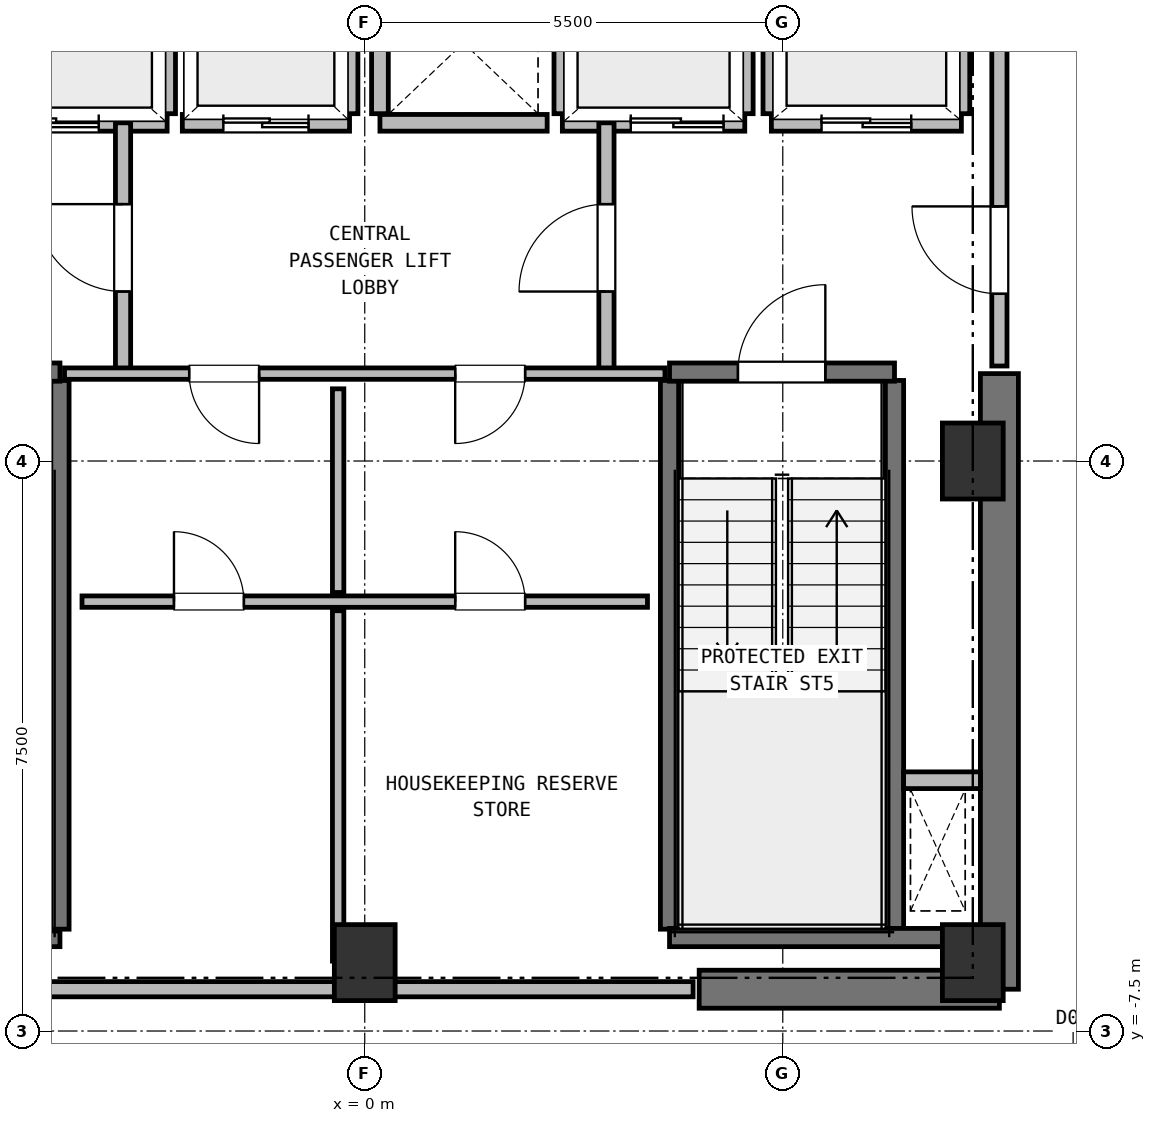
"""IFC4 building model, lengths in metres.
Left out: names, types, materials, properties, quantities, classifications, styles, units other than length and angle.
Written with IfcOpenShell. Run it as: python <this file> out.ifc"""

import sys

from ifc_helpers import new_model, si_unit, direction, frame, frame_2d, origin, origin_2d, place, context, subcontext, project, spatial, rectangle, extrude, element, fill, save


model = new_model("IFC4")
c1 = context("Model", 3, precision=1e-05, world=origin(), true_north=direction((0.0, 1.0)))
c2 = subcontext(c1, "Body", "Model", "MODEL_VIEW")
j1 = project(units=[si_unit("LENGTHUNIT", "METRE"), si_unit("PLANEANGLEUNIT", "RADIAN")], contexts=[c1])
p1 = place(None, origin())
s1 = spatial("IfcSite", under=j1, at=p1, CompositionType="ELEMENT")
p2 = place(p1, origin())
s2 = spatial("IfcBuilding", under=s1, at=p2, CompositionType="ELEMENT")
p3 = place(p2, frame((0.0, 0.0, 228.35)))
s3 = spatial("IfcBuildingStorey", under=s2, at=p3, CompositionType="ELEMENT", Elevation=228.35)
for number, where, z_axis, x_axis in (
    (1, (0.0, -6.6, 0.0), (0.0, 0.0, 1.0), (1.0, 0.0, 0.0)),
    (2, (8.0, -6.6, 0.0), (0.0, 0.0, 1.0), (1.0, 0.0, 0.0)),
    (3, (8.0, 0.0, 0.0), (0.0, 0.0, 1.0), (1.0, 0.0, 0.0)),
):
    element("IfcColumn", number, at=place(p3, frame(where, z_axis=z_axis, x_axis=x_axis)), inside=s3, PredefinedType="COLUMN", context=c2, shape_type="SweptSolid", body=[
        extrude(rectangle(XDim=0.8, YDim=1.0, at=origin_2d()), origin(), (0.0, 0.0, 1.0), 3.8),
    ])
p4 = place(p3, frame((4.4, -6.95, 0.0), z_axis=(0.0, 0.0, 1.0), x_axis=(1.0, 0.0, 0.0)))
e4 = element("IfcWall", 4, at=p4, inside=s3, PredefinedType="SHEAR", context=c2, shape_type="SweptSolid", body=[
    extrude(rectangle(XDim=3.95, YDim=0.5, at=frame_2d((1.975, 0.0))), origin(), (0.0, 0.0, 1.0), 3.55),
])
p5 = place(p3, frame((8.35, -6.95, 0.0), z_axis=(0.0, 0.0, 1.0), x_axis=(0.0, 1.0, 0.0)))
e5 = element("IfcWall", 5, at=p5, inside=s3, PredefinedType="SHEAR", context=c2, shape_type="SweptSolid", body=[
    extrude(rectangle(XDim=8.1, YDim=0.5, at=frame_2d((4.05, 0.0))), origin(), (0.0, 0.0, 1.0), 3.55),
])
p6 = place(p3, frame((-7.6, -6.27, 0.0), z_axis=(0.0, 0.0, 1.0), x_axis=(1.0, 0.0, 0.0)))
e6 = element("IfcWall", 6, at=p6, inside=s3, PredefinedType="SHEAR", context=c2, shape_type="SweptSolid", body=[
    extrude(rectangle(XDim=3.59, YDim=0.24, at=frame_2d((1.795, 0.0))), origin(), (0.0, 0.0, 1.0), 3.55),
])
p7 = place(p3, frame((-4.01, -6.16, 0.0), z_axis=(0.0, 0.0, 1.0), x_axis=(0.0, 1.0, 0.0)))
e7 = element("IfcWall", 7, at=p7, inside=s3, PredefinedType="SHEAR", context=c2, shape_type="SweptSolid", body=[
    extrude(rectangle(XDim=7.22, YDim=0.24, at=frame_2d((3.61, 0.0))), origin(), (0.0, 0.0, 1.0), 3.55),
])
p8 = place(p3, frame((-6.97, 1.17, 0.0), z_axis=(0.0, 0.0, 1.0), x_axis=(1.0, 0.0, 0.0)))
e8 = element("IfcWall", 8, at=p8, inside=s3, PredefinedType="SHEAR", context=c2, shape_type="SweptSolid", body=[
    extrude(rectangle(XDim=2.96, YDim=0.24, at=frame_2d((1.48, 0.0))), origin(), (0.0, 0.0, 1.0), 3.55),
])
p9 = place(p8, frame((0.9, 0.0, 0.0)))
e9 = element("IfcOpeningElement", 9, at=p9, cuts=e8, PredefinedType="OPENING", context=c2, shape_type="SweptSolid", body=[
    extrude(rectangle(XDim=1.15, YDim=2.15, at=frame_2d((0.575, 1.075))), frame((0.0, 0.13, 0.0), z_axis=(0.0, -1.0, 0.0), x_axis=(1.0, 0.0, 0.0)), (0.0, 0.0, 1.0), 0.26),
])
for number, where, z_axis, x_axis in (
    (10, (4.01, -6.16, 0.0), (0.0, 0.0, 1.0), (0.0, 1.0, 0.0)),
    (11, (6.97, -6.16, 0.0), (0.0, 0.0, 1.0), (0.0, 1.0, 0.0)),
):
    element("IfcWall", number, at=place(p3, frame(where, z_axis=z_axis, x_axis=x_axis)), inside=s3, PredefinedType="SHEAR", context=c2, shape_type="SweptSolid", body=[
        extrude(rectangle(XDim=7.22, YDim=0.24, at=frame_2d((3.61, 0.0))), origin(), (0.0, 0.0, 1.0), 3.55),
    ])
p10 = place(p3, frame((4.01, -6.27, 0.0), z_axis=(0.0, 0.0, 1.0), x_axis=(1.0, 0.0, 0.0)))
e12 = element("IfcWall", 12, at=p10, inside=s3, PredefinedType="SHEAR", context=c2, shape_type="SweptSolid", body=[
    extrude(rectangle(XDim=3.59, YDim=0.24, at=frame_2d((1.795, 0.0))), origin(), (0.0, 0.0, 1.0), 3.55),
])
p11 = place(p3, frame((4.01, 1.17, 0.0), z_axis=(0.0, 0.0, 1.0), x_axis=(1.0, 0.0, 0.0)))
e13 = element("IfcWall", 13, at=p11, inside=s3, PredefinedType="SHEAR", context=c2, shape_type="SweptSolid", body=[
    extrude(rectangle(XDim=2.96, YDim=0.24, at=frame_2d((1.48, 0.0))), origin(), (0.0, 0.0, 1.0), 3.55),
])
p12 = place(p11, frame((0.9, 0.0, 0.0)))
e14 = element("IfcOpeningElement", 14, at=p12, cuts=e13, PredefinedType="OPENING", context=c2, shape_type="SweptSolid", body=[
    extrude(rectangle(XDim=1.15, YDim=2.15, at=frame_2d((0.575, 1.075))), frame((0.0, 0.13, 0.0), z_axis=(0.0, -1.0, 0.0), x_axis=(1.0, 0.0, 0.0)), (0.0, 0.0, 1.0), 0.26),
])
p13 = place(p3, frame((7.09, -4.2, 0.0), z_axis=(0.0, 0.0, 1.0), x_axis=(1.0, 0.0, 0.0)))
e15 = element("IfcWall", 15, at=p13, inside=s3, PredefinedType="PARTITIONING", context=c2, shape_type="SweptSolid", body=[
    extrude(rectangle(XDim=1.01, YDim=0.22, at=frame_2d((0.505, 0.0))), origin(), (0.0, 0.0, 1.0), 3.55),
])
p14 = place(p3, frame((5.35, 4.45, 0.0), z_axis=(0.0, 0.0, 1.0), x_axis=(1.0, 0.0, 0.0)))
e16 = element("IfcWall", 16, at=p14, inside=s3, PredefinedType="PARTITIONING", context=c2, shape_type="SweptSolid", body=[
    extrude(rectangle(XDim=2.5, YDim=0.22, at=frame_2d((1.25, 0.0))), origin(), (0.0, 0.0, 1.0), 3.55),
])
p15 = place(p14, frame((0.66, 0.0, 0.0)))
e17 = element("IfcOpeningElement", 17, at=p15, cuts=e16, PredefinedType="OPENING", context=c2, shape_type="SweptSolid", body=[
    extrude(rectangle(XDim=1.18, YDim=2.15, at=frame_2d((0.59, 1.075))), frame((0.0, 0.12, 0.0), z_axis=(0.0, -1.0, 0.0), x_axis=(1.0, 0.0, 0.0)), (0.0, 0.0, 1.0), 0.24),
])
p16 = place(p3, frame((5.35, 4.57, 0.0), z_axis=(0.0, 0.0, 1.0), x_axis=(0.0, 1.0, 0.0)))
e18 = element("IfcWall", 18, at=p16, inside=s3, PredefinedType="PARTITIONING", context=c2, shape_type="SweptSolid", body=[
    extrude(rectangle(XDim=2.13, YDim=0.22, at=frame_2d((1.065, 0.0))), origin(), (0.0, 0.0, 1.0), 3.55),
])
p17 = place(p3, frame((7.85, 4.57, 0.0), z_axis=(0.0, 0.0, 1.0), x_axis=(0.0, 1.0, 0.0)))
e19 = element("IfcWall", 19, at=p17, inside=s3, PredefinedType="PARTITIONING", context=c2, shape_type="SweptSolid", body=[
    extrude(rectangle(XDim=2.13, YDim=0.22, at=frame_2d((1.065, 0.0))), origin(), (0.0, 0.0, 1.0), 3.18),
])
p18 = place(p3, frame((-5.0, 4.45, 0.0), z_axis=(0.0, 0.0, 1.0), x_axis=(1.0, 0.0, 0.0)))
e20 = element("IfcWall", 20, at=p18, inside=s3, PredefinedType="PARTITIONING", context=c2, shape_type="SweptSolid", body=[
    extrude(rectangle(XDim=2.4, YDim=0.22, at=frame_2d((1.2, 0.0))), origin(), (0.0, 0.0, 1.0), 3.55),
])
p19 = place(p18, frame((0.28, 0.0, 0.0)))
e21 = element("IfcOpeningElement", 21, at=p19, cuts=e20, PredefinedType="OPENING", context=c2, shape_type="SweptSolid", body=[
    extrude(rectangle(XDim=1.22, YDim=2.15, at=frame_2d((0.61, 1.075))), frame((0.0, 0.12, 0.0), z_axis=(0.0, -1.0, 0.0), x_axis=(1.0, 0.0, 0.0)), (0.0, 0.0, 1.0), 0.24),
])
p20 = place(p3, frame((-2.6, 4.57, 0.0), z_axis=(0.0, 0.0, 1.0), x_axis=(0.0, 1.0, 0.0)))
e22 = element("IfcWall", 22, at=p20, inside=s3, PredefinedType="PARTITIONING", context=c2, shape_type="SweptSolid", body=[
    extrude(rectangle(XDim=2.13, YDim=0.22, at=frame_2d((1.065, 0.0))), origin(), (0.0, 0.0, 1.0), 3.55),
])
p21 = place(p3, frame((2.6, 4.45, 0.0), z_axis=(0.0, 0.0, 1.0), x_axis=(1.0, 0.0, 0.0)))
e23 = element("IfcWall", 23, at=p21, inside=s3, PredefinedType="PARTITIONING", context=c2, shape_type="SweptSolid", body=[
    extrude(rectangle(XDim=2.4, YDim=0.22, at=frame_2d((1.2, 0.0))), origin(), (0.0, 0.0, 1.0), 3.55),
])
p22 = place(p21, frame((0.9, 0.0, 0.0)))
e24 = element("IfcOpeningElement", 24, at=p22, cuts=e23, PredefinedType="OPENING", context=c2, shape_type="SweptSolid", body=[
    extrude(rectangle(XDim=1.22, YDim=2.15, at=frame_2d((0.61, 1.075))), frame((0.0, 0.12, 0.0), z_axis=(0.0, -1.0, 0.0), x_axis=(1.0, 0.0, 0.0)), (0.0, 0.0, 1.0), 0.24),
])
for number, where, z_axis, x_axis in (
    (25, (2.6, 4.57, 0.0), (0.0, 0.0, 1.0), (0.0, 1.0, 0.0)),
    (26, (5.0, 4.57, 0.0), (0.0, 0.0, 1.0), (0.0, 1.0, 0.0)),
):
    element("IfcWall", number, at=place(p3, frame(where, z_axis=z_axis, x_axis=x_axis)), inside=s3, PredefinedType="PARTITIONING", context=c2, shape_type="SweptSolid", body=[
        extrude(rectangle(XDim=2.13, YDim=0.22, at=frame_2d((1.065, 0.0))), origin(), (0.0, 0.0, 1.0), 3.55),
    ])
p23 = place(p3, frame((-2.4, 4.45, 0.0), z_axis=(0.0, 0.0, 1.0), x_axis=(1.0, 0.0, 0.0)))
e27 = element("IfcWall", 27, at=p23, inside=s3, PredefinedType="PARTITIONING", context=c2, shape_type="SweptSolid", body=[
    extrude(rectangle(XDim=2.2, YDim=0.22, at=frame_2d((1.1, 0.0))), origin(), (0.0, 0.0, 1.0), 3.55),
])
p24 = place(p23, frame((0.54, 0.0, 0.0)))
e28 = element("IfcOpeningElement", 28, at=p24, cuts=e27, PredefinedType="OPENING", context=c2, shape_type="SweptSolid", body=[
    extrude(rectangle(XDim=1.12, YDim=2.15, at=frame_2d((0.56, 1.075))), frame((0.0, 0.12, 0.0), z_axis=(0.0, -1.0, 0.0), x_axis=(1.0, 0.0, 0.0)), (0.0, 0.0, 1.0), 0.24),
])
p25 = place(p3, frame((-0.2, 4.57, 0.0), z_axis=(0.0, 0.0, 1.0), x_axis=(0.0, 1.0, 0.0)))
e29 = element("IfcWall", 29, at=p25, inside=s3, PredefinedType="PARTITIONING", context=c2, shape_type="SweptSolid", body=[
    extrude(rectangle(XDim=2.13, YDim=0.22, at=frame_2d((1.065, 0.0))), origin(), (0.0, 0.0, 1.0), 3.55),
])
p26 = place(p3, frame((0.2, 4.45, 0.0), z_axis=(0.0, 0.0, 1.0), x_axis=(1.0, 0.0, 0.0)))
e30 = element("IfcWall", 30, at=p26, inside=s3, PredefinedType="PARTITIONING", context=c2, shape_type="SweptSolid", body=[
    extrude(rectangle(XDim=2.2, YDim=0.22, at=frame_2d((1.1, 0.0))), origin(), (0.0, 0.0, 1.0), 3.55),
])
p27 = place(p3, frame((0.2, 4.57, 0.0), z_axis=(0.0, 0.0, 1.0), x_axis=(0.0, 1.0, 0.0)))
e31 = element("IfcWall", 31, at=p27, inside=s3, PredefinedType="PARTITIONING", context=c2, shape_type="SweptSolid", body=[
    extrude(rectangle(XDim=2.13, YDim=0.22, at=frame_2d((1.065, 0.0))), origin(), (0.0, 0.0, 1.0), 3.55),
])
p28 = place(p3, frame((-3.18, 1.15, 0.0), z_axis=(0.0, 0.0, 1.0), x_axis=(0.0, 1.0, 0.0)))
e32 = element("IfcWall", 32, at=p28, inside=s3, PredefinedType="PARTITIONING", context=c2, shape_type="SweptSolid", body=[
    extrude(rectangle(XDim=3.3, YDim=0.2, at=frame_2d((1.65, 0.0))), origin(), (0.0, 0.0, 1.0), 3.55),
])
p29 = place(p28, frame((1.08, 0.0, 0.0)))
e33 = element("IfcOpeningElement", 33, at=p29, cuts=e32, PredefinedType="OPENING", context=c2, shape_type="SweptSolid", body=[
    extrude(rectangle(XDim=1.15, YDim=2.15, at=frame_2d((0.575, 1.075))), frame((0.0, 0.11, 0.0), z_axis=(0.0, -1.0, 0.0), x_axis=(1.0, 0.0, 0.0)), (0.0, 0.0, 1.0), 0.22),
])
p30 = place(p3, frame((3.18, 1.15, 0.0), z_axis=(0.0, 0.0, 1.0), x_axis=(0.0, 1.0, 0.0)))
e34 = element("IfcWall", 34, at=p30, inside=s3, PredefinedType="PARTITIONING", context=c2, shape_type="SweptSolid", body=[
    extrude(rectangle(XDim=3.3, YDim=0.2, at=frame_2d((1.65, 0.0))), origin(), (0.0, 0.0, 1.0), 3.55),
])
p31 = place(p30, frame((1.08, 0.0, 0.0)))
e35 = element("IfcOpeningElement", 35, at=p31, cuts=e34, PredefinedType="OPENING", context=c2, shape_type="SweptSolid", body=[
    extrude(rectangle(XDim=1.15, YDim=2.15, at=frame_2d((0.575, 1.075))), frame((0.0, 0.11, 0.0), z_axis=(0.0, -1.0, 0.0), x_axis=(1.0, 0.0, 0.0)), (0.0, 0.0, 1.0), 0.22),
])
p32 = place(p3, frame((8.35, 1.25, 0.0), z_axis=(0.0, 0.0, 1.0), x_axis=(0.0, 1.0, 0.0)))
e36 = element("IfcWall", 36, at=p32, inside=s3, PredefinedType="PARTITIONING", context=c2, shape_type="SweptSolid", body=[
    extrude(rectangle(XDim=5.3, YDim=0.2, at=frame_2d((2.65, 0.0))), origin(), (0.0, 0.0, 1.0), 3.55),
])
p33 = place(p32, frame((0.95, 0.0, 0.0)))
e37 = element("IfcOpeningElement", 37, at=p33, cuts=e36, PredefinedType="OPENING", context=c2, shape_type="SweptSolid", body=[
    extrude(rectangle(XDim=1.15, YDim=2.15, at=frame_2d((0.575, 1.075))), frame((0.0, 0.11, 0.0), z_axis=(0.0, -1.0, 0.0), x_axis=(1.0, 0.0, 0.0)), (0.0, 0.0, 1.0), 0.22),
])
p34 = place(p3, frame((3.95, 1.15, 0.0), z_axis=(0.0, 0.0, 1.0), x_axis=(-1.0, 0.0, 0.0)))
e38 = element("IfcWall", 38, at=p34, inside=s3, PredefinedType="PARTITIONING", context=c2, shape_type="SweptSolid", body=[
    extrude(rectangle(XDim=7.9, YDim=0.15, at=frame_2d((3.95, 0.0))), origin(), (0.0, 0.0, 1.0), 3.55),
])
p35 = place(p34, frame((5.34, 0.0, 0.0)))
e39 = element("IfcOpeningElement", 39, at=p35, cuts=e38, PredefinedType="OPENING", context=c2, shape_type="SweptSolid", body=[
    extrude(rectangle(XDim=0.92, YDim=2.05, at=frame_2d((0.46, 1.025))), frame((0.0, 0.085, 0.0), z_axis=(0.0, -1.0, 0.0), x_axis=(1.0, 0.0, 0.0)), (0.0, 0.0, 1.0), 0.17),
])
p36 = place(p34, frame((1.84, 0.0, 0.0)))
e40 = element("IfcOpeningElement", 40, at=p36, cuts=e38, PredefinedType="OPENING", context=c2, shape_type="SweptSolid", body=[
    extrude(rectangle(XDim=0.92, YDim=2.05, at=frame_2d((0.46, 1.025))), frame((0.0, 0.085, 0.0), z_axis=(0.0, -1.0, 0.0), x_axis=(1.0, 0.0, 0.0)), (0.0, 0.0, 1.0), 0.17),
])
p37 = place(p3, frame((-4.32, -6.95, 0.0), z_axis=(0.0, 0.0, 1.0), x_axis=(1.0, 0.0, 0.0)))
e41 = element("IfcWall", 41, at=p37, inside=s3, PredefinedType="PARTITIONING", context=c2, shape_type="SweptSolid", body=[
    extrude(rectangle(XDim=8.64, YDim=0.2, at=frame_2d((4.32, 0.0))), origin(), (0.0, 0.0, 1.0), 3.55),
])
p38 = place(p3, frame((-3.72, -1.85, 0.0), z_axis=(0.0, 0.0, 1.0), x_axis=(1.0, 0.0, 0.0)))
e42 = element("IfcWall", 42, at=p38, inside=s3, PredefinedType="PARTITIONING", context=c2, shape_type="SweptSolid", body=[
    extrude(rectangle(XDim=7.44, YDim=0.15, at=frame_2d((3.72, 0.0))), origin(), (0.0, 0.0, 1.0), 3.55),
])
p39 = place(p38, frame((1.21, 0.0, 0.0)))
e43 = element("IfcOpeningElement", 43, at=p39, cuts=e42, PredefinedType="OPENING", context=c2, shape_type="SweptSolid", body=[
    extrude(rectangle(XDim=0.92, YDim=2.05, at=frame_2d((0.46, 1.025))), frame((0.0, 0.085, 0.0), z_axis=(0.0, -1.0, 0.0), x_axis=(1.0, 0.0, 0.0)), (0.0, 0.0, 1.0), 0.17),
])
p40 = place(p38, frame((4.91, 0.0, 0.0)))
e44 = element("IfcOpeningElement", 44, at=p40, cuts=e42, PredefinedType="OPENING", context=c2, shape_type="SweptSolid", body=[
    extrude(rectangle(XDim=0.92, YDim=2.05, at=frame_2d((0.46, 1.025))), frame((0.0, 0.085, 0.0), z_axis=(0.0, -1.0, 0.0), x_axis=(1.0, 0.0, 0.0)), (0.0, 0.0, 1.0), 0.17),
])
p41 = place(p3, frame((-0.35, -6.58, 0.0), z_axis=(0.0, 0.0, 1.0), x_axis=(0.0, 1.0, 0.0)))
e45 = element("IfcWall", 45, at=p41, inside=s3, PredefinedType="PARTITIONING", context=c2, shape_type="SweptSolid", body=[
    extrude(rectangle(XDim=4.61, YDim=0.15, at=frame_2d((2.305, 0.0))), origin(), (0.0, 0.0, 1.0), 3.55),
])
p42 = place(p3, frame((-0.35, -1.73, 0.0), z_axis=(0.0, 0.0, 1.0), x_axis=(0.0, 1.0, 0.0)))
e46 = element("IfcWall", 46, at=p42, inside=s3, PredefinedType="PARTITIONING", context=c2, shape_type="SweptSolid", body=[
    extrude(rectangle(XDim=2.68, YDim=0.15, at=frame_2d((1.34, 0.0))), origin(), (0.0, 0.0, 1.0), 3.55),
])
p43 = place(p3, frame((10.422, -7.309, 0.0), z_axis=(0.0, 0.0, 1.0), x_axis=(-0.693764562202, -0.720201869085, 0.0)))
e47 = element("IfcWall", 47, at=p43, inside=s3, PredefinedType="PARTITIONING", context=c2, shape_type="SweptSolid", body=[
    extrude(rectangle(XDim=2.558, YDim=0.15, at=frame_2d((1.279, 0.0))), origin(), (0.0, 0.0, 1.0), 3.23),
])
p44 = place(p43, frame((0.789, 0.0, 0.0)))
e48 = element("IfcOpeningElement", 48, at=p44, cuts=e47, PredefinedType="OPENING", context=c2, shape_type="SweptSolid", body=[
    extrude(rectangle(XDim=1.06, YDim=2.15, at=frame_2d((0.53, 1.075))), frame((0.0, 0.085, 0.0), z_axis=(0.0, -1.0, 0.0), x_axis=(1.0, 0.0, 0.0)), (0.0, 0.0, 1.0), 0.17),
])
p45 = place(p12, origin())
e49 = element("IfcDoor", 49, at=p45, inside=s3, OperationType="SINGLE_SWING_RIGHT", PredefinedType="DOOR", context=c2, shape_type="SweptSolid", body=[
    extrude(rectangle(XDim=1.15, YDim=2.15, at=frame_2d((0.575, 1.075))), frame((0.0, 0.025, 0.0), z_axis=(0.0, -1.0, 0.0), x_axis=(1.0, 0.0, 0.0)), (0.0, 0.0, 1.0), 0.05),
])
fill(e14, e49)
p46 = place(p15, origin())
e50 = element("IfcDoor", 50, at=p46, inside=s3, OperationType="DOUBLE_DOOR_SLIDING", PredefinedType="DOOR", context=c2, shape_type="SweptSolid", body=[
    extrude(rectangle(XDim=1.18, YDim=2.15, at=frame_2d((0.59, 1.075))), frame((0.0, 0.025, 0.0), z_axis=(0.0, -1.0, 0.0), x_axis=(1.0, 0.0, 0.0)), (0.0, 0.0, 1.0), 0.05),
])
fill(e17, e50)
p47 = place(p19, origin())
e51 = element("IfcDoor", 51, at=p47, inside=s3, OperationType="DOUBLE_DOOR_SLIDING", PredefinedType="DOOR", context=c2, shape_type="SweptSolid", body=[
    extrude(rectangle(XDim=1.22, YDim=2.15, at=frame_2d((0.61, 1.075))), frame((0.0, 0.025, 0.0), z_axis=(0.0, -1.0, 0.0), x_axis=(1.0, 0.0, 0.0)), (0.0, 0.0, 1.0), 0.05),
])
fill(e21, e51)
p48 = place(p22, origin())
e52 = element("IfcDoor", 52, at=p48, inside=s3, OperationType="DOUBLE_DOOR_SLIDING", PredefinedType="DOOR", context=c2, shape_type="SweptSolid", body=[
    extrude(rectangle(XDim=1.22, YDim=2.15, at=frame_2d((0.61, 1.075))), frame((0.0, 0.025, 0.0), z_axis=(0.0, -1.0, 0.0), x_axis=(1.0, 0.0, 0.0)), (0.0, 0.0, 1.0), 0.05),
])
fill(e24, e52)
p49 = place(p24, origin())
e53 = element("IfcDoor", 53, at=p49, inside=s3, OperationType="DOUBLE_DOOR_SLIDING", PredefinedType="DOOR", context=c2, shape_type="SweptSolid", body=[
    extrude(rectangle(XDim=1.12, YDim=2.15, at=frame_2d((0.56, 1.075))), frame((0.0, 0.025, 0.0), z_axis=(0.0, -1.0, 0.0), x_axis=(1.0, 0.0, 0.0)), (0.0, 0.0, 1.0), 0.05),
])
fill(e28, e53)
p50 = place(p29, origin())
e54 = element("IfcDoor", 54, at=p50, inside=s3, OperationType="SINGLE_SWING_RIGHT", PredefinedType="DOOR", context=c2, shape_type="SweptSolid", body=[
    extrude(rectangle(XDim=1.15, YDim=2.15, at=frame_2d((0.575, 1.075))), frame((0.0, 0.025, 0.0), z_axis=(0.0, -1.0, 0.0), x_axis=(1.0, 0.0, 0.0)), (0.0, 0.0, 1.0), 0.05),
])
fill(e33, e54)
p51 = place(p31, origin())
e55 = element("IfcDoor", 55, at=p51, inside=s3, OperationType="SINGLE_SWING_LEFT", PredefinedType="DOOR", context=c2, shape_type="SweptSolid", body=[
    extrude(rectangle(XDim=1.15, YDim=2.15, at=frame_2d((0.575, 1.075))), frame((0.0, 0.025, 0.0), z_axis=(0.0, -1.0, 0.0), x_axis=(1.0, 0.0, 0.0)), (0.0, 0.0, 1.0), 0.05),
])
fill(e35, e55)
p52 = place(p33, origin())
e56 = element("IfcDoor", 56, at=p52, inside=s3, OperationType="SINGLE_SWING_RIGHT", PredefinedType="DOOR", context=c2, shape_type="SweptSolid", body=[
    extrude(rectangle(XDim=1.15, YDim=2.15, at=frame_2d((0.575, 1.075))), frame((0.0, 0.025, 0.0), z_axis=(0.0, -1.0, 0.0), x_axis=(1.0, 0.0, 0.0)), (0.0, 0.0, 1.0), 0.05),
])
fill(e37, e56)
p53 = place(p35, origin())
e57 = element("IfcDoor", 57, at=p53, inside=s3, OperationType="SINGLE_SWING_LEFT", PredefinedType="DOOR", context=c2, shape_type="SweptSolid", body=[
    extrude(rectangle(XDim=0.92, YDim=2.05, at=frame_2d((0.46, 1.025))), frame((0.0, 0.025, 0.0), z_axis=(0.0, -1.0, 0.0), x_axis=(1.0, 0.0, 0.0)), (0.0, 0.0, 1.0), 0.05),
])
fill(e39, e57)
p54 = place(p36, origin())
e58 = element("IfcDoor", 58, at=p54, inside=s3, OperationType="SINGLE_SWING_RIGHT", PredefinedType="DOOR", context=c2, shape_type="SweptSolid", body=[
    extrude(rectangle(XDim=0.92, YDim=2.05, at=frame_2d((0.46, 1.025))), frame((0.0, 0.025, 0.0), z_axis=(0.0, -1.0, 0.0), x_axis=(1.0, 0.0, 0.0)), (0.0, 0.0, 1.0), 0.05),
])
fill(e40, e58)
p55 = place(p39, origin())
e59 = element("IfcDoor", 59, at=p55, inside=s3, OperationType="SINGLE_SWING_LEFT", PredefinedType="DOOR", context=c2, shape_type="SweptSolid", body=[
    extrude(rectangle(XDim=0.92, YDim=2.05, at=frame_2d((0.46, 1.025))), frame((0.0, 0.025, 0.0), z_axis=(0.0, -1.0, 0.0), x_axis=(1.0, 0.0, 0.0)), (0.0, 0.0, 1.0), 0.05),
])
fill(e43, e59)
p56 = place(p40, origin())
e60 = element("IfcDoor", 60, at=p56, inside=s3, OperationType="SINGLE_SWING_LEFT", PredefinedType="DOOR", context=c2, shape_type="SweptSolid", body=[
    extrude(rectangle(XDim=0.92, YDim=2.05, at=frame_2d((0.46, 1.025))), frame((0.0, 0.025, 0.0), z_axis=(0.0, -1.0, 0.0), x_axis=(1.0, 0.0, 0.0)), (0.0, 0.0, 1.0), 0.05),
])
fill(e44, e60)
save(model, sys.argv[1])
